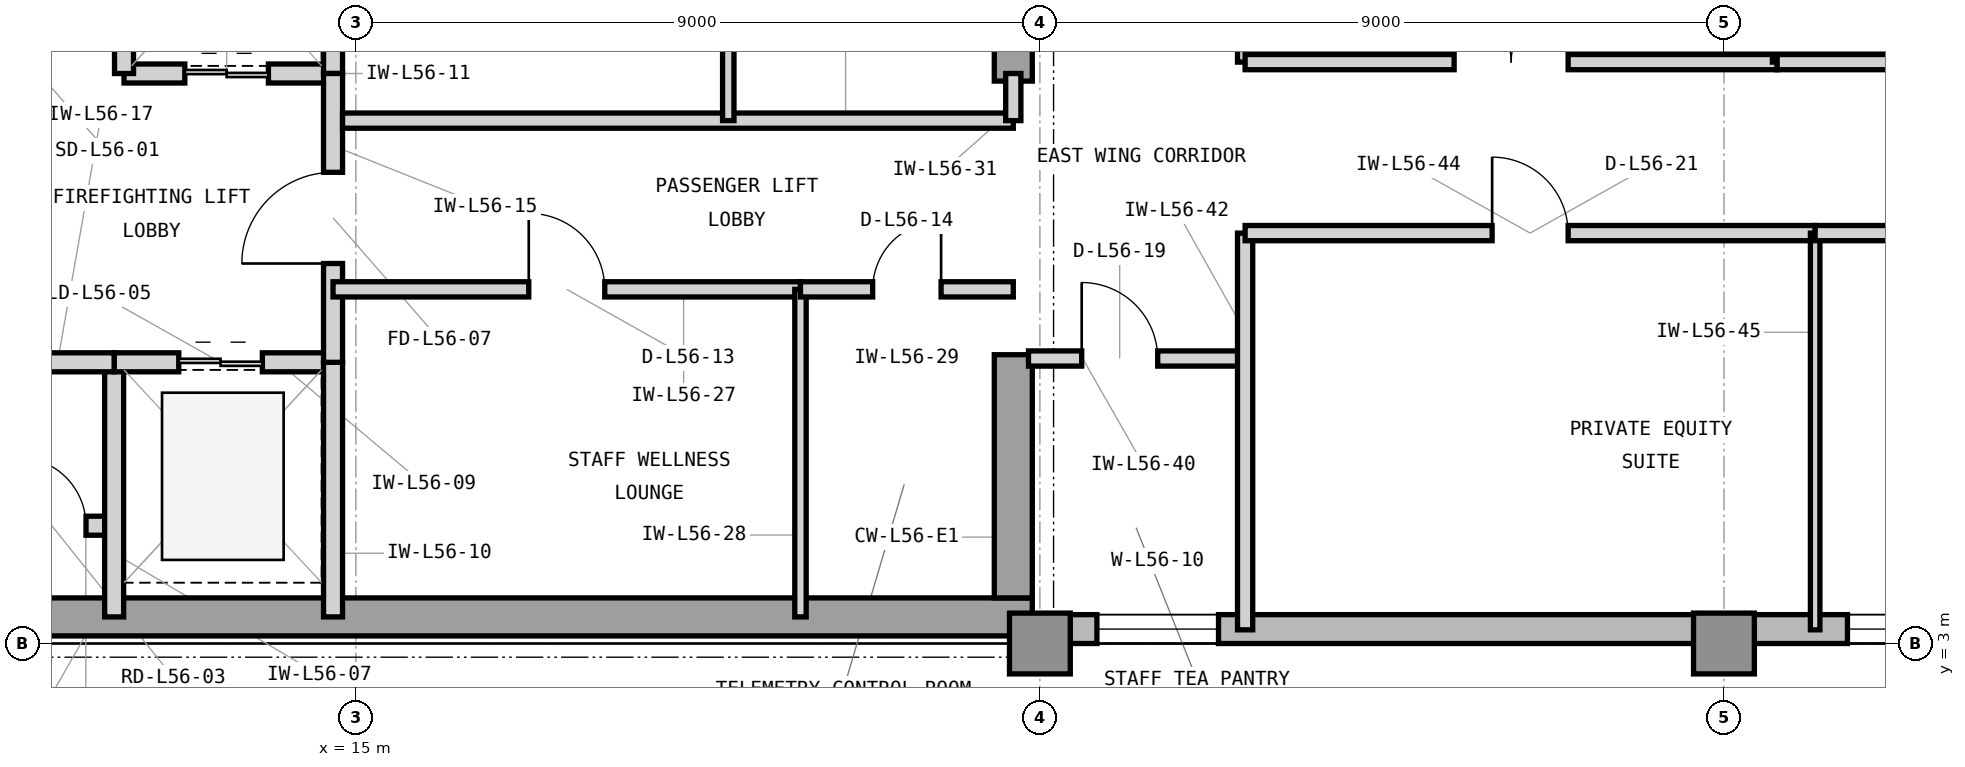
"""IFC4 building model, lengths in metres.
Left out: names, types, materials, properties, quantities, classifications, styles, units other than length and angle.
Written with IfcOpenShell. Run it as: python <this file> out.ifc"""

import sys

from ifc_helpers import new_model, si_unit, direction, frame, frame_2d, origin, origin_2d, place, context, subcontext, project, spatial, rectangle, extrude, element, fill, save


model = new_model("IFC4")
c1 = context("Model", 3, precision=1e-05, world=origin(), true_north=direction((0.0, 1.0)))
c2 = subcontext(c1, "Body", "Model", "MODEL_VIEW")
j1 = project(units=[si_unit("LENGTHUNIT", "METRE"), si_unit("PLANEANGLEUNIT", "RADIAN")], contexts=[c1])
p1 = place(None, origin())
s1 = spatial("IfcSite", under=j1, at=p1, CompositionType="ELEMENT")
p2 = place(p1, origin())
s2 = spatial("IfcBuilding", under=s1, at=p2, CompositionType="ELEMENT")
p3 = place(p2, frame((0.0, 0.0, 231.3)))
s3 = spatial("IfcBuildingStorey", under=s2, at=p3, CompositionType="ELEMENT", Elevation=231.3)
p4 = place(p3, frame((7.475, 3.35, 0.0), z_axis=(0.0, 0.0, 1.0), x_axis=(1.0, 0.0, 0.0)))
e1 = element("IfcWall", 1, at=p4, inside=s3, PredefinedType="SHEAR", context=c2, shape_type="SweptSolid", body=[
    extrude(rectangle(XDim=16.425, YDim=0.5, at=frame_2d((8.212, 0.0))), origin(), (0.0, 0.0, 1.0), 3.9),
])
p5 = place(p3, frame((23.65, 3.6, 0.0), z_axis=(0.0, 0.0, 1.0), x_axis=(0.0, 1.0, 0.0)))
e2 = element("IfcWall", 2, at=p5, inside=s3, PredefinedType="SHEAR", context=c2, shape_type="SweptSolid", body=[
    extrude(rectangle(XDim=3.2, YDim=0.5, at=frame_2d((1.6, 0.0))), origin(), (0.0, 0.0, 1.0), 3.9),
])
p6 = place(p3, frame((23.65, 10.4, 0.0), z_axis=(0.0, 0.0, 1.0), x_axis=(0.0, 1.0, 0.0)))
e3 = element("IfcWall", 3, at=p6, inside=s3, PredefinedType="SHEAR", context=c2, shape_type="SweptSolid", body=[
    extrude(rectangle(XDim=3.2, YDim=0.5, at=frame_2d((1.6, 0.0))), origin(), (0.0, 0.0, 1.0), 3.9),
])
for number, where, z_axis, x_axis in (
    (4, (24.0, 3.0, 0.0), (0.0, 0.0, 1.0), (1.0, 0.0, 0.0)),
    (5, (33.0, 3.0, 0.0), (0.0, 0.0, 1.0), (1.0, 0.0, 0.0)),
):
    element("IfcColumn", number, at=place(p3, frame(where, z_axis=z_axis, x_axis=x_axis)), inside=s3, PredefinedType="COLUMN", context=c2, shape_type="SweptSolid", body=[
        extrude(rectangle(XDim=0.8, YDim=0.8, at=origin_2d()), origin(), (0.0, 0.0, 1.0), 3.9),
    ])
p7 = place(p3, frame((23.9, 3.19, 0.0), z_axis=(0.0, 0.0, 1.0), x_axis=(1.0, 0.0, 0.0)))
e6 = element("IfcWall", 6, at=p7, inside=s3, PredefinedType="STANDARD", context=c2, shape_type="SweptSolid", body=[
    extrude(rectangle(XDim=28.5, YDim=0.38, at=frame_2d((14.25, 0.0))), origin(), (0.0, 0.0, 1.0), 3.7),
])
p8 = place(p7, frame((10.725, 0.0, 0.9)))
e7 = element("IfcOpeningElement", 7, at=p8, cuts=e6, PredefinedType="OPENING", context=c2, shape_type="SweptSolid", body=[
    extrude(rectangle(XDim=2.3, YDim=2.2, at=frame_2d((1.15, 1.1))), frame((0.0, 0.2, 0.0), z_axis=(0.0, -1.0, 0.0), x_axis=(1.0, 0.0, 0.0)), (0.0, 0.0, 1.0), 0.4),
])
p9 = place(p7, frame((20.225, 0.0, 0.9)))
e8 = element("IfcOpeningElement", 8, at=p9, cuts=e6, PredefinedType="OPENING", context=c2, shape_type="SweptSolid", body=[
    extrude(rectangle(XDim=2.3, YDim=2.2, at=frame_2d((1.15, 1.1))), frame((0.0, 0.2, 0.0), z_axis=(0.0, -1.0, 0.0), x_axis=(1.0, 0.0, 0.0)), (0.0, 0.0, 1.0), 0.4),
])
p10 = place(p7, frame((0.85, 0.0, 0.9)))
e9 = element("IfcOpeningElement", 9, at=p10, cuts=e6, PredefinedType="OPENING", context=c2, shape_type="SweptSolid", body=[
    extrude(rectangle(XDim=1.6, YDim=2.2, at=frame_2d((0.8, 1.1))), frame((0.0, 0.2, 0.0), z_axis=(0.0, -1.0, 0.0), x_axis=(1.0, 0.0, 0.0)), (0.0, 0.0, 1.0), 0.4),
])
p11 = place(p3, frame((10.33, 4.55, 0.0), z_axis=(0.0, 0.0, 1.0), x_axis=(1.0, 0.0, 0.0)))
e10 = element("IfcWall", 10, at=p11, inside=s3, PredefinedType="PARTITIONING", context=c2, shape_type="SweptSolid", body=[
    extrude(rectangle(XDim=1.49, YDim=0.25, at=frame_2d((0.745, 0.0))), origin(), (0.0, 0.0, 1.0), 3.69),
])
p12 = place(p11, frame((0.22, 0.0, 0.0)))
e11 = element("IfcOpeningElement", 11, at=p12, cuts=e10, PredefinedType="OPENING", context=c2, shape_type="SweptSolid", body=[
    extrude(rectangle(XDim=0.9, YDim=2.1, at=frame_2d((0.45, 1.05))), frame((0.0, 0.135, 0.0), z_axis=(0.0, -1.0, 0.0), x_axis=(1.0, 0.0, 0.0)), (0.0, 0.0, 1.0), 0.27),
])
p13 = place(p3, frame((11.82, 3.35, 0.0), z_axis=(0.0, 0.0, 1.0), x_axis=(0.0, 1.0, 0.0)))
e12 = element("IfcWall", 12, at=p13, inside=s3, PredefinedType="PARTITIONING", context=c2, shape_type="SweptSolid", body=[
    extrude(rectangle(XDim=3.35, YDim=0.25, at=frame_2d((1.675, 0.0))), origin(), (0.0, 0.0, 1.0), 3.69),
])
p14 = place(p3, frame((11.82, 6.7, 0.0), z_axis=(0.0, 0.0, 1.0), x_axis=(1.0, 0.0, 0.0)))
e13 = element("IfcWall", 13, at=p14, inside=s3, PredefinedType="PARTITIONING", context=c2, shape_type="SweptSolid", body=[
    extrude(rectangle(XDim=2.88, YDim=0.25, at=frame_2d((1.44, 0.0))), origin(), (0.0, 0.0, 1.0), 3.073),
])
p15 = place(p14, frame((0.85, 0.0, 0.0)))
e14 = element("IfcOpeningElement", 14, at=p15, cuts=e13, PredefinedType="OPENING", context=c2, shape_type="SweptSolid", body=[
    extrude(rectangle(XDim=1.1, YDim=2.25, at=frame_2d((0.55, 1.125))), frame((0.0, 0.135, 0.0), z_axis=(0.0, -1.0, 0.0), x_axis=(1.0, 0.0, 0.0)), (0.0, 0.0, 1.0), 0.27),
])
p16 = place(p3, frame((14.7, 3.35, 0.0), z_axis=(0.0, 0.0, 1.0), x_axis=(0.0, 1.0, 0.0)))
e15 = element("IfcWall", 15, at=p16, inside=s3, PredefinedType="PARTITIONING", context=c2, shape_type="SweptSolid", body=[
    extrude(rectangle(XDim=3.35, YDim=0.25, at=frame_2d((1.675, 0.0))), origin(), (0.0, 0.0, 1.0), 3.69),
])
p17 = place(p3, frame((11.95, 10.5, 0.0), z_axis=(0.0, 0.0, 1.0), x_axis=(1.0, 0.0, 0.0)))
e16 = element("IfcWall", 16, at=p17, inside=s3, PredefinedType="PARTITIONING", context=c2, shape_type="SweptSolid", body=[
    extrude(rectangle(XDim=2.75, YDim=0.25, at=frame_2d((1.375, 0.0))), origin(), (0.0, 0.0, 1.0), 3.073),
])
p18 = place(p17, frame((0.8, 0.0, 0.0)))
e17 = element("IfcOpeningElement", 17, at=p18, cuts=e16, PredefinedType="OPENING", context=c2, shape_type="SweptSolid", body=[
    extrude(rectangle(XDim=1.1, YDim=2.25, at=frame_2d((0.55, 1.125))), frame((0.0, 0.135, 0.0), z_axis=(0.0, -1.0, 0.0), x_axis=(1.0, 0.0, 0.0)), (0.0, 0.0, 1.0), 0.27),
])
for number, where, z_axis, x_axis in (
    (18, (11.95, 10.5, 0.0), (0.0, 0.0, 1.0), (0.0, 1.0, 0.0)),
    (19, (14.7, 10.5, 0.0), (0.0, 0.0, 1.0), (0.0, 1.0, 0.0)),
):
    element("IfcWall", number, at=place(p3, frame(where, z_axis=z_axis, x_axis=x_axis)), inside=s3, PredefinedType="PARTITIONING", context=c2, shape_type="SweptSolid", body=[
        extrude(rectangle(XDim=3.0, YDim=0.25, at=frame_2d((1.5, 0.0))), origin(), (0.0, 0.0, 1.0), 3.69),
    ])
p19 = place(p3, frame((14.7, 6.7, 0.0), z_axis=(0.0, 0.0, 1.0), x_axis=(0.0, 1.0, 0.0)))
e20 = element("IfcWall", 20, at=p19, inside=s3, PredefinedType="PARTITIONING", context=c2, shape_type="SweptSolid", body=[
    extrude(rectangle(XDim=3.8, YDim=0.25, at=frame_2d((1.9, 0.0))), origin(), (0.0, 0.0, 1.0), 3.69),
])
p20 = place(p19, frame((1.3, 0.0, 0.0)))
e21 = element("IfcOpeningElement", 21, at=p20, cuts=e20, PredefinedType="OPENING", context=c2, shape_type="SweptSolid", body=[
    extrude(rectangle(XDim=1.2, YDim=2.2, at=frame_2d((0.6, 1.1))), frame((0.0, 0.135, 0.0), z_axis=(0.0, -1.0, 0.0), x_axis=(1.0, 0.0, 0.0)), (0.0, 0.0, 1.0), 0.27),
])
p21 = place(p3, frame((10.33, 6.7, 0.0), z_axis=(0.0, 0.0, 1.0), x_axis=(1.0, 0.0, 0.0)))
e22 = element("IfcWall", 22, at=p21, inside=s3, PredefinedType="PARTITIONING", context=c2, shape_type="SweptSolid", body=[
    extrude(rectangle(XDim=1.49, YDim=0.25, at=frame_2d((0.745, 0.0))), origin(), (0.0, 0.0, 1.0), 3.073),
])
p22 = place(p3, frame((14.7, 7.66, 0.0), z_axis=(0.0, 0.0, 1.0), x_axis=(1.0, 0.0, 0.0)))
e23 = element("IfcWall", 23, at=p22, inside=s3, PredefinedType="PARTITIONING", context=c2, shape_type="SweptSolid", body=[
    extrude(rectangle(XDim=6.15, YDim=0.2, at=frame_2d((3.075, 0.0))), origin(), (0.0, 0.0, 1.0), 3.69),
])
p23 = place(p22, frame((2.575, 0.0, 0.0)))
e24 = element("IfcOpeningElement", 24, at=p23, cuts=e23, PredefinedType="OPENING", context=c2, shape_type="SweptSolid", body=[
    extrude(rectangle(XDim=1.0, YDim=2.15, at=frame_2d((0.5, 1.075))), frame((0.0, 0.11, 0.0), z_axis=(0.0, -1.0, 0.0), x_axis=(1.0, 0.0, 0.0)), (0.0, 0.0, 1.0), 0.22),
])
p24 = place(p3, frame((20.85, 3.35, 0.0), z_axis=(0.0, 0.0, 1.0), x_axis=(0.0, 1.0, 0.0)))
e25 = element("IfcWall", 25, at=p24, inside=s3, PredefinedType="PARTITIONING", context=c2, shape_type="SweptSolid", body=[
    extrude(rectangle(XDim=4.31, YDim=0.15, at=frame_2d((2.155, 0.0))), origin(), (0.0, 0.0, 1.0), 3.69),
])
p25 = place(p3, frame((20.85, 7.66, 0.0), z_axis=(0.0, 0.0, 1.0), x_axis=(1.0, 0.0, 0.0)))
e26 = element("IfcWall", 26, at=p25, inside=s3, PredefinedType="PARTITIONING", context=c2, shape_type="SweptSolid", body=[
    extrude(rectangle(XDim=2.8, YDim=0.2, at=frame_2d((1.4, 0.0))), origin(), (0.0, 0.0, 1.0), 3.69),
])
p26 = place(p25, frame((0.95, 0.0, 0.0)))
e27 = element("IfcOpeningElement", 27, at=p26, cuts=e26, PredefinedType="OPENING", context=c2, shape_type="SweptSolid", body=[
    extrude(rectangle(XDim=0.9, YDim=2.1, at=frame_2d((0.45, 1.05))), frame((0.0, 0.11, 0.0), z_axis=(0.0, -1.0, 0.0), x_axis=(1.0, 0.0, 0.0)), (0.0, 0.0, 1.0), 0.22),
])
p27 = place(p3, frame((14.825, 9.88, 0.0), z_axis=(0.0, 0.0, 1.0), x_axis=(1.0, 0.0, 0.0)))
e28 = element("IfcWall", 28, at=p27, inside=s3, PredefinedType="PARTITIONING", context=c2, shape_type="SweptSolid", body=[
    extrude(rectangle(XDim=8.825, YDim=0.2, at=frame_2d((4.413, 0.0))), origin(), (0.0, 0.0, 1.0), 3.69),
])
p28 = place(p3, frame((23.65, 9.88, 0.0), z_axis=(0.0, 0.0, 1.0), x_axis=(0.0, 1.0, 0.0)))
e29 = element("IfcWall", 29, at=p28, inside=s3, PredefinedType="PARTITIONING", context=c2, shape_type="SweptSolid", body=[
    extrude(rectangle(XDim=0.62, YDim=0.2, at=frame_2d((0.31, 0.0))), origin(), (0.0, 0.0, 1.0), 3.69),
])
p29 = place(p3, frame((19.9, 9.88, 0.0), z_axis=(0.0, 0.0, 1.0), x_axis=(0.0, 1.0, 0.0)))
e30 = element("IfcWall", 30, at=p29, inside=s3, PredefinedType="PARTITIONING", context=c2, shape_type="SweptSolid", body=[
    extrude(rectangle(XDim=3.62, YDim=0.15, at=frame_2d((1.81, 0.0))), origin(), (0.0, 0.0, 1.0), 3.69),
])
p30 = place(p3, frame((23.85, 6.75, 0.0), z_axis=(0.0, 0.0, 1.0), x_axis=(1.0, 0.0, 0.0)))
e31 = element("IfcWall", 31, at=p30, inside=s3, PredefinedType="PARTITIONING", context=c2, shape_type="SweptSolid", body=[
    extrude(rectangle(XDim=2.85, YDim=0.2, at=frame_2d((1.425, 0.0))), origin(), (0.0, 0.0, 1.0), 3.69),
])
p31 = place(p30, frame((0.7, 0.0, 0.0)))
e32 = element("IfcOpeningElement", 32, at=p31, cuts=e31, PredefinedType="OPENING", context=c2, shape_type="SweptSolid", body=[
    extrude(rectangle(XDim=1.0, YDim=2.15, at=frame_2d((0.5, 1.075))), frame((0.0, 0.11, 0.0), z_axis=(0.0, -1.0, 0.0), x_axis=(1.0, 0.0, 0.0)), (0.0, 0.0, 1.0), 0.22),
])
p32 = place(p3, frame((26.7, 3.18, 0.0), z_axis=(0.0, 0.0, 1.0), x_axis=(0.0, 1.0, 0.0)))
e33 = element("IfcWall", 33, at=p32, inside=s3, PredefinedType="PARTITIONING", context=c2, shape_type="SweptSolid", body=[
    extrude(rectangle(XDim=5.22, YDim=0.2, at=frame_2d((2.61, 0.0))), origin(), (0.0, 0.0, 1.0), 3.69),
])
p33 = place(p3, frame((26.7, 10.65, 0.0), z_axis=(0.0, 0.0, 1.0), x_axis=(0.0, 1.0, 0.0)))
e34 = element("IfcWall", 34, at=p33, inside=s3, PredefinedType="PARTITIONING", context=c2, shape_type="SweptSolid", body=[
    extrude(rectangle(XDim=10.17, YDim=0.2, at=frame_2d((5.085, 0.0))), origin(), (0.0, 0.0, 1.0), 3.69),
])
p34 = place(p3, frame((26.7, 8.4, 0.0), z_axis=(0.0, 0.0, 1.0), x_axis=(1.0, 0.0, 0.0)))
e35 = element("IfcWall", 35, at=p34, inside=s3, PredefinedType="PARTITIONING", context=c2, shape_type="SweptSolid", body=[
    extrude(rectangle(XDim=7.5, YDim=0.2, at=frame_2d((3.75, 0.0))), origin(), (0.0, 0.0, 1.0), 3.69),
])
p35 = place(p34, frame((3.25, 0.0, 0.0)))
e36 = element("IfcOpeningElement", 36, at=p35, cuts=e35, PredefinedType="OPENING", context=c2, shape_type="SweptSolid", body=[
    extrude(rectangle(XDim=1.0, YDim=2.15, at=frame_2d((0.5, 1.075))), frame((0.0, 0.11, 0.0), z_axis=(0.0, -1.0, 0.0), x_axis=(1.0, 0.0, 0.0)), (0.0, 0.0, 1.0), 0.22),
])
p36 = place(p3, frame((34.2, 3.18, 0.0), z_axis=(0.0, 0.0, 1.0), x_axis=(0.0, 1.0, 0.0)))
e37 = element("IfcWall", 37, at=p36, inside=s3, PredefinedType="PARTITIONING", context=c2, shape_type="SweptSolid", body=[
    extrude(rectangle(XDim=5.22, YDim=0.125, at=frame_2d((2.61, 0.0))), origin(), (0.0, 0.0, 1.0), 3.69),
])
p37 = place(p3, frame((34.2, 8.4, 0.0), z_axis=(0.0, 0.0, 1.0), x_axis=(1.0, 0.0, 0.0)))
e38 = element("IfcWall", 38, at=p37, inside=s3, PredefinedType="PARTITIONING", context=c2, shape_type="SweptSolid", body=[
    extrude(rectangle(XDim=7.5, YDim=0.2, at=frame_2d((3.75, 0.0))), origin(), (0.0, 0.0, 1.0), 3.69),
])
p38 = place(p37, frame((3.25, 0.0, 0.0)))
e39 = element("IfcOpeningElement", 39, at=p38, cuts=e38, PredefinedType="OPENING", context=c2, shape_type="SweptSolid", body=[
    extrude(rectangle(XDim=1.0, YDim=2.15, at=frame_2d((0.5, 1.075))), frame((0.0, 0.11, 0.0), z_axis=(0.0, -1.0, 0.0), x_axis=(1.0, 0.0, 0.0)), (0.0, 0.0, 1.0), 0.22),
])
p39 = place(p3, frame((26.7, 10.65, 0.0), z_axis=(0.0, 0.0, 1.0), x_axis=(1.0, 0.0, 0.0)))
e40 = element("IfcWall", 40, at=p39, inside=s3, PredefinedType="PARTITIONING", context=c2, shape_type="SweptSolid", body=[
    extrude(rectangle(XDim=7.0, YDim=0.2, at=frame_2d((3.5, 0.0))), origin(), (0.0, 0.0, 1.0), 3.69),
])
p40 = place(p39, frame((2.75, 0.0, 0.0)))
e41 = element("IfcOpeningElement", 41, at=p40, cuts=e40, PredefinedType="OPENING", context=c2, shape_type="SweptSolid", body=[
    extrude(rectangle(XDim=1.5, YDim=2.3, at=frame_2d((0.75, 1.15))), frame((0.0, 0.11, 0.0), z_axis=(0.0, -1.0, 0.0), x_axis=(1.0, 0.0, 0.0)), (0.0, 0.0, 1.0), 0.22),
])
p41 = place(p3, frame((33.7, 10.65, 0.0), z_axis=(0.0, 0.0, 1.0), x_axis=(0.0, 1.0, 0.0)))
e42 = element("IfcWall", 42, at=p41, inside=s3, PredefinedType="PARTITIONING", context=c2, shape_type="SweptSolid", body=[
    extrude(rectangle(XDim=10.17, YDim=0.125, at=frame_2d((5.085, 0.0))), origin(), (0.0, 0.0, 1.0), 3.69),
])
p42 = place(p3, frame((33.7, 10.65, 0.0), z_axis=(0.0, 0.0, 1.0), x_axis=(1.0, 0.0, 0.0)))
e43 = element("IfcWall", 43, at=p42, inside=s3, PredefinedType="PARTITIONING", context=c2, shape_type="SweptSolid", body=[
    extrude(rectangle(XDim=7.0, YDim=0.2, at=frame_2d((3.5, 0.0))), origin(), (0.0, 0.0, 1.0), 3.69),
])
p43 = place(p42, frame((3.0, 0.0, 0.0)))
e44 = element("IfcOpeningElement", 44, at=p43, cuts=e43, PredefinedType="OPENING", context=c2, shape_type="SweptSolid", body=[
    extrude(rectangle(XDim=1.0, YDim=2.15, at=frame_2d((0.5, 1.075))), frame((0.0, 0.11, 0.0), z_axis=(0.0, -1.0, 0.0), x_axis=(1.0, 0.0, 0.0)), (0.0, 0.0, 1.0), 0.22),
])
p44 = place(p8, origin())
e45 = element("IfcWindow", 45, at=p44, inside=s3, PartitioningType="SINGLE_PANEL", PredefinedType="WINDOW", context=c2, shape_type="SweptSolid", body=[
    extrude(rectangle(XDim=2.3, YDim=2.2, at=frame_2d((1.15, 1.1))), frame((0.0, 0.11, 0.0), z_axis=(0.0, -1.0, 0.0), x_axis=(1.0, 0.0, 0.0)), (0.0, 0.0, 1.0), 0.06),
])
fill(e7, e45)
p45 = place(p12, origin())
e46 = element("IfcDoor", 46, at=p45, inside=s3, OperationType="SINGLE_SWING_LEFT", PredefinedType="TRAPDOOR", context=c2, shape_type="SweptSolid", body=[
    extrude(rectangle(XDim=0.9, YDim=2.1, at=frame_2d((0.45, 1.05))), frame((0.0, 0.025, 0.0), z_axis=(0.0, -1.0, 0.0), x_axis=(1.0, 0.0, 0.0)), (0.0, 0.0, 1.0), 0.05),
])
fill(e11, e46)
p46 = place(p15, origin())
e47 = element("IfcDoor", 47, at=p46, inside=s3, OperationType="DOUBLE_DOOR_SLIDING", PredefinedType="DOOR", context=c2, shape_type="SweptSolid", body=[
    extrude(rectangle(XDim=1.1, YDim=2.25, at=frame_2d((0.55, 1.125))), frame((0.0, 0.025, 0.0), z_axis=(0.0, -1.0, 0.0), x_axis=(1.0, 0.0, 0.0)), (0.0, 0.0, 1.0), 0.05),
])
fill(e14, e47)
p47 = place(p18, origin())
e48 = element("IfcDoor", 48, at=p47, inside=s3, OperationType="DOUBLE_DOOR_SLIDING", PredefinedType="DOOR", context=c2, shape_type="SweptSolid", body=[
    extrude(rectangle(XDim=1.1, YDim=2.25, at=frame_2d((0.55, 1.125))), frame((0.0, 0.025, 0.0), z_axis=(0.0, -1.0, 0.0), x_axis=(1.0, 0.0, 0.0)), (0.0, 0.0, 1.0), 0.05),
])
fill(e17, e48)
p48 = place(p20, origin())
e49 = element("IfcDoor", 49, at=p48, inside=s3, OperationType="SINGLE_SWING_LEFT", PredefinedType="DOOR", context=c2, shape_type="SweptSolid", body=[
    extrude(rectangle(XDim=1.2, YDim=2.2, at=frame_2d((0.6, 1.1))), frame((0.0, 0.025, 0.0), z_axis=(0.0, -1.0, 0.0), x_axis=(1.0, 0.0, 0.0)), (0.0, 0.0, 1.0), 0.05),
])
fill(e21, e49)
p49 = place(p23, origin())
e50 = element("IfcDoor", 50, at=p49, inside=s3, OperationType="SINGLE_SWING_LEFT", PredefinedType="DOOR", context=c2, shape_type="SweptSolid", body=[
    extrude(rectangle(XDim=1.0, YDim=2.15, at=frame_2d((0.5, 1.075))), frame((0.0, 0.025, 0.0), z_axis=(0.0, -1.0, 0.0), x_axis=(1.0, 0.0, 0.0)), (0.0, 0.0, 1.0), 0.05),
])
fill(e24, e50)
p50 = place(p26, origin())
e51 = element("IfcDoor", 51, at=p50, inside=s3, OperationType="SINGLE_SWING_RIGHT", PredefinedType="TRAPDOOR", context=c2, shape_type="SweptSolid", body=[
    extrude(rectangle(XDim=0.9, YDim=2.1, at=frame_2d((0.45, 1.05))), frame((0.0, 0.025, 0.0), z_axis=(0.0, -1.0, 0.0), x_axis=(1.0, 0.0, 0.0)), (0.0, 0.0, 1.0), 0.05),
])
fill(e27, e51)
p51 = place(p31, origin())
e52 = element("IfcDoor", 52, at=p51, inside=s3, OperationType="SINGLE_SWING_LEFT", PredefinedType="DOOR", context=c2, shape_type="SweptSolid", body=[
    extrude(rectangle(XDim=1.0, YDim=2.15, at=frame_2d((0.5, 1.075))), frame((0.0, 0.025, 0.0), z_axis=(0.0, -1.0, 0.0), x_axis=(1.0, 0.0, 0.0)), (0.0, 0.0, 1.0), 0.05),
])
fill(e32, e52)
p52 = place(p35, origin())
e53 = element("IfcDoor", 53, at=p52, inside=s3, OperationType="SINGLE_SWING_LEFT", PredefinedType="DOOR", context=c2, shape_type="SweptSolid", body=[
    extrude(rectangle(XDim=1.0, YDim=2.15, at=frame_2d((0.5, 1.075))), frame((0.0, 0.025, 0.0), z_axis=(0.0, -1.0, 0.0), x_axis=(1.0, 0.0, 0.0)), (0.0, 0.0, 1.0), 0.05),
])
fill(e36, e53)
p53 = place(p40, origin())
e54 = element("IfcDoor", 54, at=p53, inside=s3, OperationType="DOUBLE_DOOR_SINGLE_SWING", PredefinedType="DOOR", context=c2, shape_type="SweptSolid", body=[
    extrude(rectangle(XDim=1.5, YDim=2.3, at=frame_2d((0.75, 1.15))), frame((0.0, 0.025, 0.0), z_axis=(0.0, -1.0, 0.0), x_axis=(1.0, 0.0, 0.0)), (0.0, 0.0, 1.0), 0.05),
])
fill(e41, e54)
p54 = place(p10, origin())
e55 = element("IfcWindow", 55, at=p54, inside=s3, PartitioningType="SINGLE_PANEL", PredefinedType="WINDOW", context=c2, shape_type="SweptSolid", body=[
    extrude(rectangle(XDim=1.6, YDim=2.2, at=frame_2d((0.8, 1.1))), frame((0.0, 0.11, 0.0), z_axis=(0.0, -1.0, 0.0), x_axis=(1.0, 0.0, 0.0)), (0.0, 0.0, 1.0), 0.06),
])
fill(e9, e55)
save(model, sys.argv[1])
